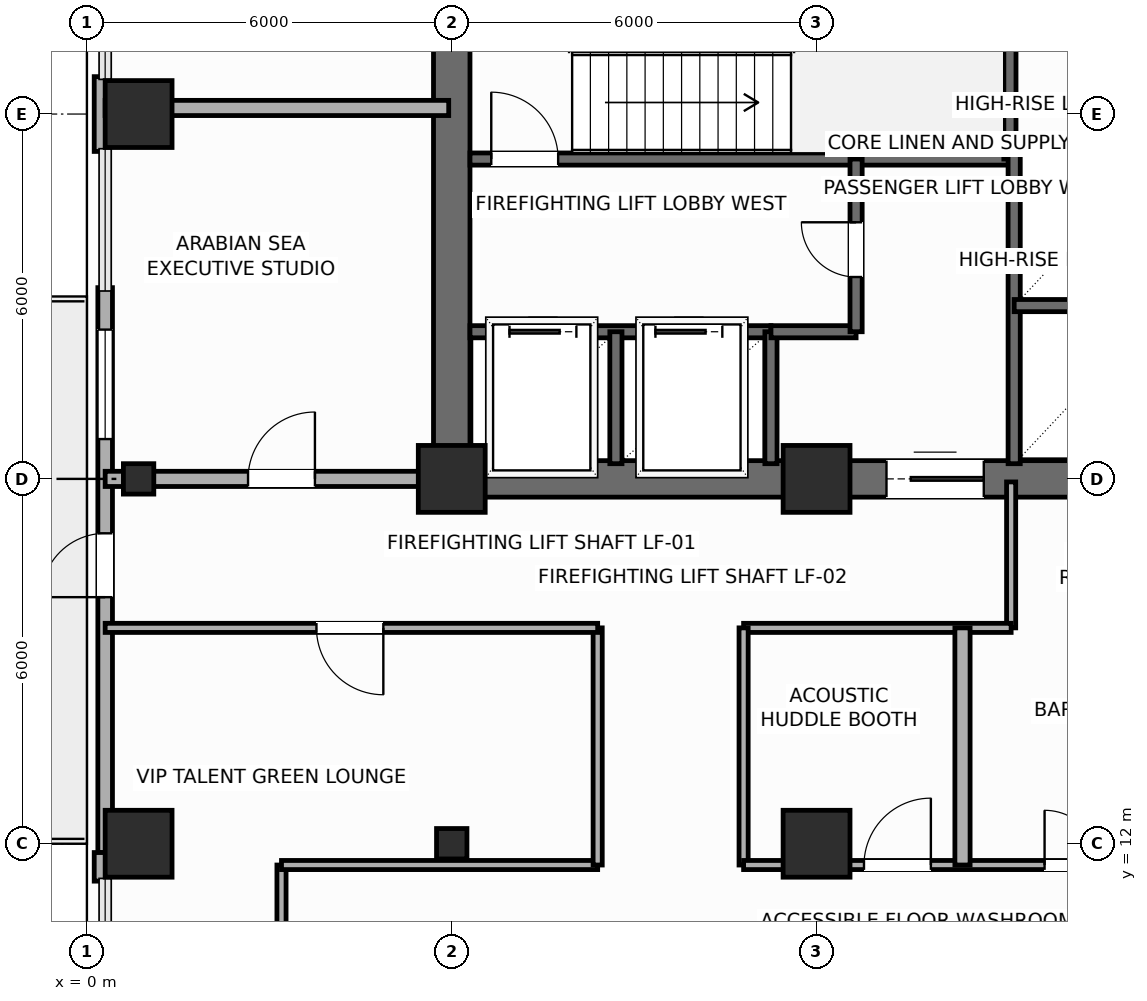
"""IFC4 building model, lengths in metres.
Left out: names, types, materials, properties, quantities, classifications, styles, units other than length and angle.
Written with IfcOpenShell. Run it as: python <this file> out.ifc"""

import sys

from ifc_helpers import new_model, si_unit, direction, frame, frame_2d, origin, origin_2d, place, context, subcontext, project, spatial, rectangle, hollow_rectangle, extrude, element, fill, save


model = new_model("IFC4")
c1 = context("Model", 3, precision=1e-05, world=origin(), true_north=direction((0.0, 1.0)))
c2 = subcontext(c1, "Body", "Model", "MODEL_VIEW")
j1 = project(units=[si_unit("LENGTHUNIT", "METRE"), si_unit("PLANEANGLEUNIT", "RADIAN")], contexts=[c1])
p1 = place(None, origin())
s1 = spatial("IfcSite", under=j1, at=p1, CompositionType="ELEMENT")
p2 = place(p1, origin())
s2 = spatial("IfcBuilding", under=s1, at=p2, CompositionType="ELEMENT")
p3 = place(p2, frame((0.0, 0.0, 126.9)))
s3 = spatial("IfcBuildingStorey", under=s2, at=p3, CompositionType="ELEMENT", Elevation=126.9)
for number, where, z_axis, x_axis in (
    (1, (6.0, 18.0, 0.0), (0.0, 0.0, 1.0), (1.0, 0.0, 0.0)),
    (2, (12.0, 18.0, 0.0), (0.0, 0.0, 1.0), (1.0, 0.0, 0.0)),
    (3, (0.85, 12.0, 0.0), (0.0, 0.0, 1.0), (1.0, 0.0, 0.0)),
):
    element("IfcColumn", number, at=place(p3, frame(where, z_axis=z_axis, x_axis=x_axis)), inside=s3, PredefinedType="COLUMN", context=c2, shape_type="SweptSolid", body=[
        extrude(rectangle(XDim=1.1, YDim=1.1, at=origin_2d()), origin(), (0.0, 0.0, 1.0), 3.75),
    ])
p4 = place(p3, frame((0.85, 18.0, 0.0), z_axis=(0.0, 0.0, 1.0), x_axis=(1.0, 0.0, 0.0)))
e4 = element("IfcColumn", 4, at=p4, inside=s3, PredefinedType="COLUMN", context=c2, shape_type="SweptSolid", body=[
    extrude(hollow_rectangle(XDim=0.5, YDim=0.5, WallThickness=0.025, InnerFilletRadius=0.025, OuterFilletRadius=0.04, at=origin_2d()), origin(), (0.0, 0.0, 1.0), 3.75),
])
p5 = place(p3, frame((0.85, 24.0, 0.0), z_axis=(0.0, 0.0, 1.0), x_axis=(1.0, 0.0, 0.0)))
e5 = element("IfcColumn", 5, at=p5, inside=s3, PredefinedType="COLUMN", context=c2, shape_type="SweptSolid", body=[
    extrude(rectangle(XDim=1.1, YDim=1.1, at=origin_2d()), origin(), (0.0, 0.0, 1.0), 3.75),
])
p6 = place(p3, frame((6.0, 12.0, 0.0), z_axis=(0.0, 0.0, 1.0), x_axis=(1.0, 0.0, 0.0)))
e6 = element("IfcColumn", 6, at=p6, inside=s3, PredefinedType="COLUMN", context=c2, shape_type="SweptSolid", body=[
    extrude(hollow_rectangle(XDim=0.5, YDim=0.5, WallThickness=0.025, InnerFilletRadius=0.025, OuterFilletRadius=0.04, at=origin_2d()), origin(), (0.0, 0.0, 1.0), 3.75),
])
p7 = place(p3, frame((12.0, 12.0, 0.0), z_axis=(0.0, 0.0, 1.0), x_axis=(1.0, 0.0, 0.0)))
e7 = element("IfcColumn", 7, at=p7, inside=s3, PredefinedType="COLUMN", context=c2, shape_type="SweptSolid", body=[
    extrude(rectangle(XDim=1.1, YDim=1.1, at=origin_2d()), origin(), (0.0, 0.0, 1.0), 3.75),
])
p8 = place(p3, frame((0.3, 11.855, 0.0), z_axis=(0.0, 0.0, 1.0), x_axis=(0.0, 1.0, 0.0)))
e8 = element("IfcWall", 8, at=p8, inside=s3, PredefinedType="SOLIDWALL", context=c2, shape_type="SweptSolid", body=[
    extrude(rectangle(XDim=9.29, YDim=0.24, at=frame_2d((4.645, 0.0))), origin(), (0.0, 0.0, 1.0), 3.525),
])
p9 = place(p8, frame((4.2, 0.0, 0.0)))
e9 = element("IfcOpeningElement", 9, at=p9, cuts=e8, PredefinedType="OPENING", context=c2, shape_type="SweptSolid", body=[
    extrude(rectangle(XDim=1.05, YDim=2.2, at=frame_2d((0.525, 1.1))), frame((0.0, 0.13, 0.0), z_axis=(0.0, -1.0, 0.0), x_axis=(1.0, 0.0, 0.0)), (0.0, 0.0, 1.0), 0.26),
])
p10 = place(p8, frame((6.8, 0.0, 0.85)))
e10 = element("IfcOpeningElement", 10, at=p10, cuts=e8, PredefinedType="OPENING", context=c2, shape_type="SweptSolid", body=[
    extrude(rectangle(XDim=1.8, YDim=2.1, at=frame_2d((0.9, 1.05))), frame((0.0, 0.13, 0.0), z_axis=(0.0, -1.0, 0.0), x_axis=(1.0, 0.0, 0.0)), (0.0, 0.0, 1.0), 0.26),
])
p11 = place(p3, frame((0.24, 11.385, 0.0), z_axis=(0.0, 0.0, 1.0), x_axis=(0.0, 1.0, 0.0)))
e11 = element("IfcWall", 11, at=p11, inside=s3, PredefinedType="SOLIDWALL", context=c2, shape_type="SweptSolid", body=[
    extrude(rectangle(XDim=0.47, YDim=0.24, at=frame_2d((0.235, 0.0))), origin(), (0.0, 0.0, 1.0), 3.525),
])
p12 = place(p3, frame((0.24, 23.385, 0.0), z_axis=(0.0, 0.0, 1.0), x_axis=(0.0, 1.0, 0.0)))
e12 = element("IfcWall", 12, at=p12, inside=s3, PredefinedType="SOLIDWALL", context=c2, shape_type="SweptSolid", body=[
    extrude(rectangle(XDim=1.23, YDim=0.24, at=frame_2d((0.615, 0.0))), origin(), (0.0, 0.0, 1.0), 3.525),
])
p13 = place(p3, frame((6.0, 18.0, 0.0), z_axis=(0.0, 0.0, 1.0), x_axis=(1.0, 0.0, 0.0)))
e13 = element("IfcWall", 13, at=p13, inside=s3, PredefinedType="SHEAR", context=c2, shape_type="SweptSolid", body=[
    extrude(rectangle(XDim=12.0, YDim=0.6, at=frame_2d((6.0, 0.0))), origin(), (0.0, 0.0, 1.0), 3.525),
])
p14 = place(p13, frame((7.15, 0.0, 0.0)))
e14 = element("IfcOpeningElement", 14, at=p14, cuts=e13, PredefinedType="OPENING", context=c2, shape_type="SweptSolid", body=[
    extrude(rectangle(XDim=1.6, YDim=2.3, at=frame_2d((0.8, 1.15))), frame((0.0, 0.31, 0.0), z_axis=(0.0, -1.0, 0.0), x_axis=(1.0, 0.0, 0.0)), (0.0, 0.0, 1.0), 0.62),
])
p15 = place(p3, frame((6.0, 18.0, 0.0), z_axis=(0.0, 0.0, 1.0), x_axis=(0.0, 1.0, 0.0)))
e15 = element("IfcWall", 15, at=p15, inside=s3, PredefinedType="SHEAR", context=c2, shape_type="SweptSolid", body=[
    extrude(rectangle(XDim=9.6, YDim=0.6, at=frame_2d((4.8, 0.0))), origin(), (0.0, 0.0, 1.0), 3.525),
])
p16 = place(p3, frame((6.3, 23.26, 0.0), z_axis=(0.0, 0.0, 1.0), x_axis=(1.0, 0.0, 0.0)))
e16 = element("IfcWall", 16, at=p16, inside=s3, PredefinedType="SHEAR", context=c2, shape_type="SweptSolid", body=[
    extrude(rectangle(XDim=8.88, YDim=0.2, at=frame_2d((4.44, 0.0))), origin(), (0.0, 0.0, 1.0), 3.525),
])
p17 = place(p16, frame((0.35, 0.0, 0.0)))
e17 = element("IfcOpeningElement", 17, at=p17, cuts=e16, PredefinedType="OPENING", context=c2, shape_type="SweptSolid", body=[
    extrude(rectangle(XDim=1.1, YDim=2.2, at=frame_2d((0.55, 1.1))), frame((0.0, 0.11, 0.0), z_axis=(0.0, -1.0, 0.0), x_axis=(1.0, 0.0, 0.0)), (0.0, 0.0, 1.0), 0.22),
])
p18 = place(p3, frame((15.18, 23.26, 0.0), z_axis=(0.0, 0.0, 1.0), x_axis=(0.0, 1.0, 0.0)))
e18 = element("IfcWall", 18, at=p18, inside=s3, PredefinedType="SHEAR", context=c2, shape_type="SweptSolid", body=[
    extrude(rectangle(XDim=4.04, YDim=0.2, at=frame_2d((2.02, 0.0))), origin(), (0.0, 0.0, 1.0), 3.525),
])
p19 = place(p3, frame((6.3, 20.42, 0.0), z_axis=(0.0, 0.0, 1.0), x_axis=(1.0, 0.0, 0.0)))
e19 = element("IfcWall", 19, at=p19, inside=s3, PredefinedType="SHEAR", context=c2, shape_type="SweptSolid", body=[
    extrude(rectangle(XDim=4.95, YDim=0.2, at=frame_2d((2.475, 0.0))), origin(), (0.0, 0.0, 1.0), 3.525),
])
p20 = place(p19, frame((0.65, 0.0, 0.0)))
e20 = element("IfcOpeningElement", 20, at=p20, cuts=e19, PredefinedType="OPENING", context=c2, shape_type="SweptSolid", body=[
    extrude(rectangle(XDim=1.1, YDim=2.2, at=frame_2d((0.55, 1.1))), frame((0.0, 0.11, 0.0), z_axis=(0.0, -1.0, 0.0), x_axis=(1.0, 0.0, 0.0)), (0.0, 0.0, 1.0), 0.22),
])
p21 = place(p19, frame((3.05, 0.0, 0.0)))
e21 = element("IfcOpeningElement", 21, at=p21, cuts=e19, PredefinedType="OPENING", context=c2, shape_type="SweptSolid", body=[
    extrude(rectangle(XDim=1.1, YDim=2.2, at=frame_2d((0.55, 1.1))), frame((0.0, 0.11, 0.0), z_axis=(0.0, -1.0, 0.0), x_axis=(1.0, 0.0, 0.0)), (0.0, 0.0, 1.0), 0.22),
])
for number, where, z_axis, x_axis in (
    (22, (8.7, 18.25, 0.0), (0.0, 0.0, 1.0), (0.0, 1.0, 0.0)),
    (23, (11.25, 18.25, 0.0), (0.0, 0.0, 1.0), (0.0, 1.0, 0.0)),
):
    element("IfcWall", number, at=place(p3, frame(where, z_axis=z_axis, x_axis=x_axis)), inside=s3, PredefinedType="SHEAR", context=c2, shape_type="SweptSolid", body=[
        extrude(rectangle(XDim=2.17, YDim=0.2, at=frame_2d((1.085, 0.0))), origin(), (0.0, 0.0, 1.0), 3.525),
    ])
p22 = place(p3, frame((11.25, 20.42, 0.0), z_axis=(0.0, 0.0, 1.0), x_axis=(1.0, 0.0, 0.0)))
e24 = element("IfcWall", 24, at=p22, inside=s3, PredefinedType="SHEAR", context=c2, shape_type="SweptSolid", body=[
    extrude(rectangle(XDim=1.4, YDim=0.2, at=frame_2d((0.7, 0.0))), origin(), (0.0, 0.0, 1.0), 3.525),
])
p23 = place(p3, frame((12.65, 20.42, 0.0), z_axis=(0.0, 0.0, 1.0), x_axis=(0.0, 1.0, 0.0)))
e25 = element("IfcWall", 25, at=p23, inside=s3, PredefinedType="SHEAR", context=c2, shape_type="SweptSolid", body=[
    extrude(rectangle(XDim=2.84, YDim=0.2, at=frame_2d((1.42, 0.0))), origin(), (0.0, 0.0, 1.0), 3.525),
])
p24 = place(p23, frame((0.9, 0.0, 0.0)))
e26 = element("IfcOpeningElement", 26, at=p24, cuts=e25, PredefinedType="OPENING", context=c2, shape_type="SweptSolid", body=[
    extrude(rectangle(XDim=0.9, YDim=2.15, at=frame_2d((0.45, 1.075))), frame((0.0, 0.11, 0.0), z_axis=(0.0, -1.0, 0.0), x_axis=(1.0, 0.0, 0.0)), (0.0, 0.0, 1.0), 0.22),
])
p25 = place(p3, frame((15.25, 18.25, 0.0), z_axis=(0.0, 0.0, 1.0), x_axis=(0.0, 1.0, 0.0)))
e27 = element("IfcWall", 27, at=p25, inside=s3, PredefinedType="SHEAR", context=c2, shape_type="SweptSolid", body=[
    extrude(rectangle(XDim=5.2, YDim=0.2, at=frame_2d((2.6, 0.0))), origin(), (0.0, 0.0, 1.0), 3.525),
])
p26 = place(p3, frame((15.25, 20.85, 0.0), z_axis=(0.0, 0.0, 1.0), x_axis=(1.0, 0.0, 0.0)))
e28 = element("IfcWall", 28, at=p26, inside=s3, PredefinedType="SHEAR", context=c2, shape_type="SweptSolid", body=[
    extrude(rectangle(XDim=2.4, YDim=0.2, at=frame_2d((1.2, 0.0))), origin(), (0.0, 0.0, 1.0), 3.525),
])
p27 = place(p3, frame((15.25, 23.45, 0.0), z_axis=(0.0, 0.0, 1.0), x_axis=(1.0, 0.0, 0.0)))
e29 = element("IfcWall", 29, at=p27, inside=s3, PredefinedType="SHEAR", context=c2, shape_type="SweptSolid", body=[
    extrude(rectangle(XDim=2.45, YDim=0.2, at=frame_2d((1.225, 0.0))), origin(), (0.0, 0.0, 1.0), 3.525),
])
p28 = place(p3, frame((3.2, 9.6, 0.0), z_axis=(0.0, 0.0, 1.0), x_axis=(0.0, 1.0, 0.0)))
e30 = element("IfcWall", 30, at=p28, inside=s3, PredefinedType="PARTITIONING", context=c2, shape_type="SweptSolid", body=[
    extrude(rectangle(XDim=2.05, YDim=0.15, at=frame_2d((1.025, 0.0))), origin(), (0.0, 0.0, 1.0), 3.525),
])
p29 = place(p3, frame((3.2, 11.65, 0.0), z_axis=(0.0, 0.0, 1.0), x_axis=(1.0, 0.0, 0.0)))
e31 = element("IfcWall", 31, at=p29, inside=s3, PredefinedType="PARTITIONING", context=c2, shape_type="SweptSolid", body=[
    extrude(rectangle(XDim=5.2, YDim=0.15, at=frame_2d((2.6, 0.0))), origin(), (0.0, 0.0, 1.0), 3.525),
])
p30 = place(p3, frame((8.4, 11.65, 0.0), z_axis=(0.0, 0.0, 1.0), x_axis=(0.0, 1.0, 0.0)))
e32 = element("IfcWall", 32, at=p30, inside=s3, PredefinedType="PARTITIONING", context=c2, shape_type="SweptSolid", body=[
    extrude(rectangle(XDim=3.9, YDim=0.15, at=frame_2d((1.95, 0.0))), origin(), (0.0, 0.0, 1.0), 3.525),
])
p31 = place(p3, frame((8.4, 15.55, 0.0), z_axis=(0.0, 0.0, 1.0), x_axis=(-1.0, 0.0, 0.0)))
e33 = element("IfcWall", 33, at=p31, inside=s3, PredefinedType="PARTITIONING", context=c2, shape_type="SweptSolid", body=[
    extrude(rectangle(XDim=8.1, YDim=0.15, at=frame_2d((4.05, 0.0))), origin(), (0.0, 0.0, 1.0), 3.525),
])
p32 = place(p31, frame((3.525, 0.0, 0.0)))
e34 = element("IfcOpeningElement", 34, at=p32, cuts=e33, PredefinedType="OPENING", context=c2, shape_type="SweptSolid", body=[
    extrude(rectangle(XDim=1.1, YDim=2.25, at=frame_2d((0.55, 1.125))), frame((0.0, 0.085, 0.0), z_axis=(0.0, -1.0, 0.0), x_axis=(1.0, 0.0, 0.0)), (0.0, 0.0, 1.0), 0.17),
])
p33 = place(p3, frame((15.2, 17.95, 0.0), z_axis=(0.0, 0.0, 1.0), x_axis=(0.0, -1.0, 0.0)))
e35 = element("IfcWall", 35, at=p33, inside=s3, PredefinedType="PARTITIONING", context=c2, shape_type="SweptSolid", body=[
    extrude(rectangle(XDim=2.4, YDim=0.15, at=frame_2d((1.2, 0.0))), origin(), (0.0, 0.0, 1.0), 3.525),
])
p34 = place(p3, frame((15.2, 15.55, 0.0), z_axis=(0.0, 0.0, 1.0), x_axis=(-1.0, 0.0, 0.0)))
e36 = element("IfcWall", 36, at=p34, inside=s3, PredefinedType="PARTITIONING", context=c2, shape_type="SweptSolid", body=[
    extrude(rectangle(XDim=4.4, YDim=0.15, at=frame_2d((2.2, 0.0))), origin(), (0.0, 0.0, 1.0), 3.525),
])
p35 = place(p3, frame((10.8, 15.55, 0.0), z_axis=(0.0, 0.0, 1.0), x_axis=(0.0, -1.0, 0.0)))
e37 = element("IfcWall", 37, at=p35, inside=s3, PredefinedType="PARTITIONING", context=c2, shape_type="SweptSolid", body=[
    extrude(rectangle(XDim=3.9, YDim=0.15, at=frame_2d((1.95, 0.0))), origin(), (0.0, 0.0, 1.0), 3.525),
])
p36 = place(p3, frame((10.8, 11.65, 0.0), z_axis=(0.0, 0.0, 1.0), x_axis=(1.0, 0.0, 0.0)))
e38 = element("IfcWall", 38, at=p36, inside=s3, PredefinedType="PARTITIONING", context=c2, shape_type="SweptSolid", body=[
    extrude(rectangle(XDim=10.55, YDim=0.15, at=frame_2d((5.275, 0.0))), origin(), (0.0, 0.0, 1.0), 3.525),
])
p37 = place(p36, frame((1.98, 0.0, 0.0)))
e39 = element("IfcOpeningElement", 39, at=p37, cuts=e38, PredefinedType="OPENING", context=c2, shape_type="SweptSolid", body=[
    extrude(rectangle(XDim=1.1, YDim=2.25, at=frame_2d((0.55, 1.125))), frame((0.0, 0.085, 0.0), z_axis=(0.0, -1.0, 0.0), x_axis=(1.0, 0.0, 0.0)), (0.0, 0.0, 1.0), 0.17),
])
p38 = place(p36, frame((4.95, 0.0, 0.0)))
e40 = element("IfcOpeningElement", 40, at=p38, cuts=e38, PredefinedType="OPENING", context=c2, shape_type="SweptSolid", body=[
    extrude(rectangle(XDim=0.9, YDim=2.1, at=frame_2d((0.45, 1.05))), frame((0.0, 0.085, 0.0), z_axis=(0.0, -1.0, 0.0), x_axis=(1.0, 0.0, 0.0)), (0.0, 0.0, 1.0), 0.17),
])
p39 = place(p36, frame((8.425, 0.0, 0.0)))
e41 = element("IfcOpeningElement", 41, at=p39, cuts=e38, PredefinedType="OPENING", context=c2, shape_type="SweptSolid", body=[
    extrude(rectangle(XDim=0.9, YDim=2.1, at=frame_2d((0.45, 1.05))), frame((0.0, 0.085, 0.0), z_axis=(0.0, -1.0, 0.0), x_axis=(1.0, 0.0, 0.0)), (0.0, 0.0, 1.0), 0.17),
])
p40 = place(p3, frame((14.4, 11.65, 0.0), z_axis=(0.0, 0.0, 1.0), x_axis=(0.0, 1.0, 0.0)))
e42 = element("IfcWall", 42, at=p40, inside=s3, PredefinedType="PARTITIONING", context=c2, shape_type="SweptSolid", body=[
    extrude(rectangle(XDim=3.9, YDim=0.25, at=frame_2d((1.95, 0.0))), origin(), (0.0, 0.0, 1.0), 3.525),
])
p41 = place(p3, frame((0.3, 18.0, 0.0), z_axis=(0.0, 0.0, 1.0), x_axis=(1.0, 0.0, 0.0)))
e43 = element("IfcWall", 43, at=p41, inside=s3, PredefinedType="PARTITIONING", context=c2, shape_type="SweptSolid", body=[
    extrude(rectangle(XDim=5.65, YDim=0.25, at=frame_2d((2.825, 0.0))), origin(), (0.0, 0.0, 1.0), 3.017),
])
p42 = place(p41, frame((2.35, 0.0, 0.0)))
e44 = element("IfcOpeningElement", 44, at=p42, cuts=e43, PredefinedType="OPENING", context=c2, shape_type="SweptSolid", body=[
    extrude(rectangle(XDim=1.1, YDim=2.25, at=frame_2d((0.55, 1.125))), frame((0.0, 0.135, 0.0), z_axis=(0.0, -1.0, 0.0), x_axis=(1.0, 0.0, 0.0)), (0.0, 0.0, 1.0), 0.27),
])
p43 = place(p3, frame((0.3, 24.1, 0.0), z_axis=(0.0, 0.0, 1.0), x_axis=(1.0, 0.0, 0.0)))
e45 = element("IfcWall", 45, at=p43, inside=s3, PredefinedType="PARTITIONING", context=c2, shape_type="SweptSolid", body=[
    extrude(rectangle(XDim=5.65, YDim=0.25, at=frame_2d((2.825, 0.0))), origin(), (0.0, 0.0, 1.0), 3.525),
])
p44 = place(p9, origin())
e46 = element("IfcDoor", 46, at=p44, inside=s3, OperationType="SINGLE_SWING_LEFT", PredefinedType="DOOR", context=c2, shape_type="SweptSolid", body=[
    extrude(rectangle(XDim=1.05, YDim=2.2, at=frame_2d((0.525, 1.1))), frame((0.0, 0.025, 0.0), z_axis=(0.0, -1.0, 0.0), x_axis=(1.0, 0.0, 0.0)), (0.0, 0.0, 1.0), 0.05),
])
fill(e9, e46)
p45 = place(p10, origin())
e47 = element("IfcWindow", 47, at=p45, inside=s3, PartitioningType="SINGLE_PANEL", PredefinedType="WINDOW", context=c2, shape_type="SweptSolid", body=[
    extrude(rectangle(XDim=1.8, YDim=2.1, at=frame_2d((0.9, 1.05))), frame((0.0, 0.03, 0.0), z_axis=(0.0, -1.0, 0.0), x_axis=(1.0, 0.0, 0.0)), (0.0, 0.0, 1.0), 0.06),
])
fill(e10, e47)
p46 = place(p14, origin())
e48 = element("IfcDoor", 48, at=p46, inside=s3, OperationType="DOUBLE_DOOR_SLIDING", PredefinedType="DOOR", context=c2, shape_type="SweptSolid", body=[
    extrude(rectangle(XDim=1.6, YDim=2.3, at=frame_2d((0.8, 1.15))), frame((0.0, 0.025, 0.0), z_axis=(0.0, -1.0, 0.0), x_axis=(1.0, 0.0, 0.0)), (0.0, 0.0, 1.0), 0.05),
])
fill(e14, e48)
p47 = place(p17, origin())
e49 = element("IfcDoor", 49, at=p47, inside=s3, OperationType="SINGLE_SWING_LEFT", PredefinedType="DOOR", context=c2, shape_type="SweptSolid", body=[
    extrude(rectangle(XDim=1.1, YDim=2.2, at=frame_2d((0.55, 1.1))), frame((0.0, 0.025, 0.0), z_axis=(0.0, -1.0, 0.0), x_axis=(1.0, 0.0, 0.0)), (0.0, 0.0, 1.0), 0.05),
])
fill(e17, e49)
p48 = place(p20, origin())
e50 = element("IfcDoor", 50, at=p48, inside=s3, OperationType="SLIDING_TO_LEFT", PredefinedType="DOOR", context=c2, shape_type="SweptSolid", body=[
    extrude(rectangle(XDim=1.1, YDim=2.2, at=frame_2d((0.55, 1.1))), frame((0.0, 0.025, 0.0), z_axis=(0.0, -1.0, 0.0), x_axis=(1.0, 0.0, 0.0)), (0.0, 0.0, 1.0), 0.05),
])
fill(e20, e50)
p49 = place(p21, origin())
e51 = element("IfcDoor", 51, at=p49, inside=s3, OperationType="SLIDING_TO_LEFT", PredefinedType="DOOR", context=c2, shape_type="SweptSolid", body=[
    extrude(rectangle(XDim=1.1, YDim=2.2, at=frame_2d((0.55, 1.1))), frame((0.0, 0.025, 0.0), z_axis=(0.0, -1.0, 0.0), x_axis=(1.0, 0.0, 0.0)), (0.0, 0.0, 1.0), 0.05),
])
fill(e21, e51)
p50 = place(p24, origin())
e52 = element("IfcDoor", 52, at=p50, inside=s3, OperationType="SINGLE_SWING_RIGHT", PredefinedType="DOOR", context=c2, shape_type="SweptSolid", body=[
    extrude(rectangle(XDim=0.9, YDim=2.15, at=frame_2d((0.45, 1.075))), frame((0.0, 0.025, 0.0), z_axis=(0.0, -1.0, 0.0), x_axis=(1.0, 0.0, 0.0)), (0.0, 0.0, 1.0), 0.05),
])
fill(e26, e52)
p51 = place(p32, origin())
e53 = element("IfcDoor", 53, at=p51, inside=s3, OperationType="SINGLE_SWING_LEFT", PredefinedType="DOOR", context=c2, shape_type="SweptSolid", body=[
    extrude(rectangle(XDim=1.1, YDim=2.25, at=frame_2d((0.55, 1.125))), frame((0.0, 0.025, 0.0), z_axis=(0.0, -1.0, 0.0), x_axis=(1.0, 0.0, 0.0)), (0.0, 0.0, 1.0), 0.05),
])
fill(e34, e53)
p52 = place(p37, origin())
e54 = element("IfcDoor", 54, at=p52, inside=s3, OperationType="SINGLE_SWING_RIGHT", PredefinedType="DOOR", context=c2, shape_type="SweptSolid", body=[
    extrude(rectangle(XDim=1.1, YDim=2.25, at=frame_2d((0.55, 1.125))), frame((0.0, 0.025, 0.0), z_axis=(0.0, -1.0, 0.0), x_axis=(1.0, 0.0, 0.0)), (0.0, 0.0, 1.0), 0.05),
])
fill(e39, e54)
p53 = place(p38, origin())
e55 = element("IfcDoor", 55, at=p53, inside=s3, OperationType="SINGLE_SWING_LEFT", PredefinedType="DOOR", context=c2, shape_type="SweptSolid", body=[
    extrude(rectangle(XDim=0.9, YDim=2.1, at=frame_2d((0.45, 1.05))), frame((0.0, 0.025, 0.0), z_axis=(0.0, -1.0, 0.0), x_axis=(1.0, 0.0, 0.0)), (0.0, 0.0, 1.0), 0.05),
])
fill(e40, e55)
p54 = place(p42, origin())
e56 = element("IfcDoor", 56, at=p54, inside=s3, OperationType="SINGLE_SWING_RIGHT", PredefinedType="DOOR", context=c2, shape_type="SweptSolid", body=[
    extrude(rectangle(XDim=1.1, YDim=2.25, at=frame_2d((0.55, 1.125))), frame((0.0, 0.025, 0.0), z_axis=(0.0, -1.0, 0.0), x_axis=(1.0, 0.0, 0.0)), (0.0, 0.0, 1.0), 0.05),
])
fill(e44, e56)
save(model, sys.argv[1])
